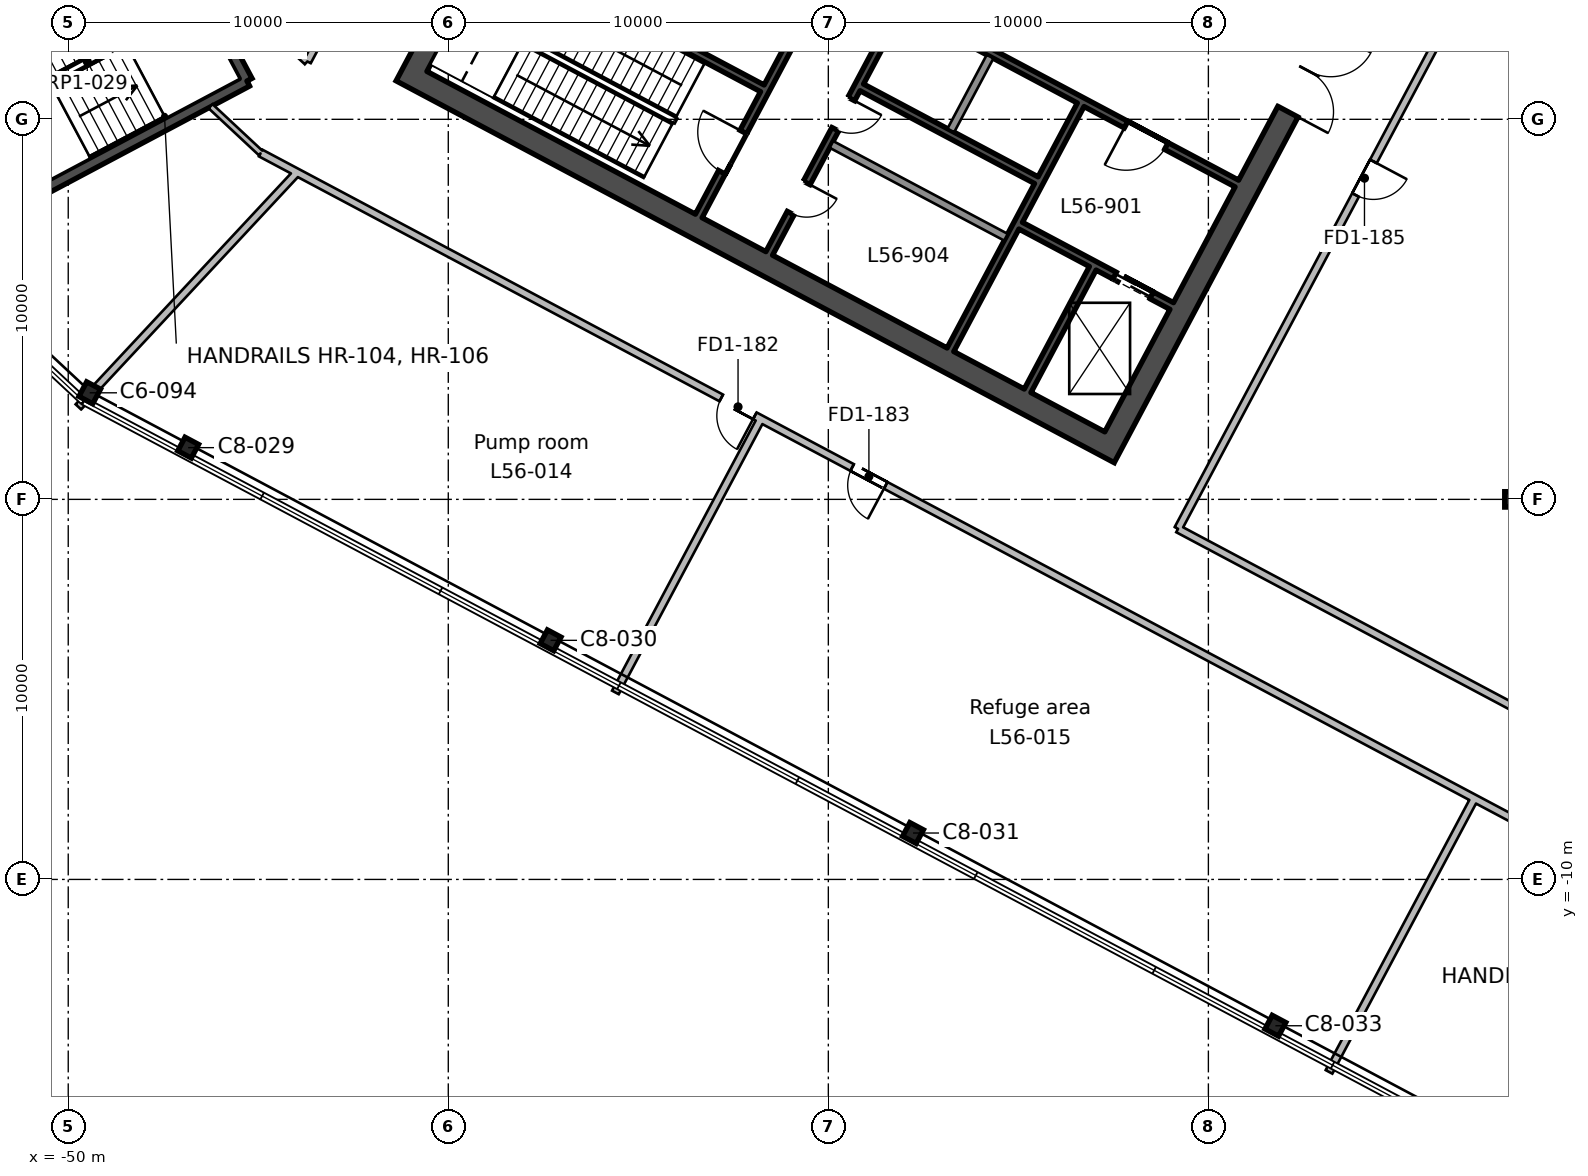
"""IFC4 building model, lengths in metres.
Left out: names, types, materials, properties, quantities, classifications, styles, units other than length and angle.
Written with IfcOpenShell. Run it as: python <this file> out.ifc"""

import sys

from ifc_helpers import new_model, si_unit, direction, frame, frame_2d, origin, origin_2d, place, context, subcontext, project, spatial, rectangle, hollow_rectangle, i_section, extrude, element, fill, save


model = new_model("IFC4")
c1 = context("Model", 3, precision=1e-05, world=origin(), true_north=direction((0.0, 1.0)))
c2 = subcontext(c1, "Body", "Model", "MODEL_VIEW")
j1 = project(units=[si_unit("LENGTHUNIT", "METRE"), si_unit("PLANEANGLEUNIT", "RADIAN")], contexts=[c1])
p1 = place(None, origin())
s1 = spatial("IfcSite", under=j1, at=p1, CompositionType="ELEMENT")
p2 = place(p1, origin())
s2 = spatial("IfcBuilding", under=s1, at=p2, CompositionType="ELEMENT")
p3 = place(p2, frame((0.0, 0.0, 252.0)))
s3 = spatial("IfcBuildingStorey", under=s2, at=p3, CompositionType="ELEMENT", Elevation=252.0)
for number, where, z_axis, x_axis in (
    (1, (-18.237, -13.85, 0.0), (0.0, 0.0, 1.0), (0.883, -0.469, 0.0)),
    (2, (-27.772, -8.779, 0.0), (0.0, 0.0, 1.0), (0.883, -0.469, 0.0)),
    (3, (-37.308, -3.709, 0.0), (0.0, 0.0, 1.0), (0.883, -0.469, 0.0)),
):
    element("IfcColumn", number, at=place(p3, frame(where, z_axis=z_axis, x_axis=x_axis)), inside=s3, PredefinedType="COLUMN", context=c2, shape_type="SweptSolid", body=[
        extrude(i_section(OverallWidth=0.404, OverallDepth=0.406, WebThickness=0.027, FlangeThickness=0.044, FilletRadius=0.015, at=origin_2d()), origin(), (0.0, 0.0, 1.0), 6.0),
    ])
p4 = place(p3, frame((-12.0, 0.0, 0.0), z_axis=(0.0, 0.0, 1.0), x_axis=(1.0, 0.0, 0.0)))
e4 = element("IfcColumn", 4, at=p4, inside=s3, PredefinedType="COLUMN", context=c2, shape_type="SweptSolid", body=[
    extrude(hollow_rectangle(XDim=0.406, YDim=0.406, WallThickness=0.015, InnerFilletRadius=0.007, OuterFilletRadius=0.022, at=origin_2d()), origin(), (0.0, 0.0, 1.0), 6.0),
])
p5 = place(p3, frame((-46.844, 1.361, 0.0), z_axis=(0.0, 0.0, 1.0), x_axis=(0.882947592859, -0.469471562786, 0.0)))
e5 = element("IfcColumn", 5, at=p5, inside=s3, PredefinedType="COLUMN", context=c2, shape_type="SweptSolid", body=[
    extrude(i_section(OverallWidth=0.404, OverallDepth=0.406, WebThickness=0.027, FlangeThickness=0.044, FilletRadius=0.015, at=origin_2d()), origin(), (0.0, 0.0, 1.0), 6.0),
])
p6 = place(p3, frame((-49.435, 2.804, 0.0), z_axis=(0.0, 0.0, 1.0), x_axis=(0.882947592859, -0.469471562786, 0.0)))
e6 = element("IfcColumn", 6, at=p6, inside=s3, PredefinedType="COLUMN", context=c2, shape_type="SweptSolid", body=[
    extrude(i_section(OverallWidth=0.412, OverallDepth=0.434, WebThickness=0.036, FlangeThickness=0.057, FilletRadius=0.015, at=origin_2d()), origin(), (0.0, 0.0, 1.0), 6.0),
])
p7 = place(p3, frame((-13.635, 18.236, 0.0), z_axis=(0.0, 0.0, 1.0), x_axis=(-0.469478769487, -0.88294376095, 0.0)))
e7 = element("IfcWall", 7, at=p7, inside=s3, PredefinedType="SHEAR", context=c2, shape_type="SweptSolid", body=[
    extrude(rectangle(XDim=19.4, YDim=0.6, at=frame_2d((9.7, 0.0))), origin(), (0.0, 0.0, 1.0), 6.0),
])
p8 = place(p7, frame((6.7, 0.0, 0.0)))
e8 = element("IfcOpeningElement", 8, at=p8, cuts=e7, PredefinedType="OPENING", context=c2, shape_type="SweptSolid", body=[
    extrude(rectangle(XDim=2.4, YDim=2.4, at=frame_2d((1.2, 1.2))), frame((0.0, 0.31, 0.0), z_axis=(0.0, -1.0, 0.0), x_axis=(1.0, 0.0, 0.0)), (0.0, 0.0, 1.0), 0.62),
])
p9 = place(p3, frame((-32.0, 28.001, 0.0), z_axis=(0.0, 0.0, 1.0), x_axis=(-0.469468958625, -0.882948977511, 0.0)))
e9 = element("IfcWall", 9, at=p9, inside=s3, PredefinedType="SHEAR", context=c2, shape_type="SweptSolid", body=[
    extrude(rectangle(XDim=19.4, YDim=0.6, at=frame_2d((9.7, 0.0))), origin(), (0.0, 0.0, 1.0), 6.0),
])
p10 = place(p9, frame((10.3, 0.0, 0.0)))
e10 = element("IfcOpeningElement", 10, at=p10, cuts=e9, PredefinedType="OPENING", context=c2, shape_type="SweptSolid", body=[
    extrude(rectangle(XDim=2.4, YDim=2.4, at=frame_2d((1.2, 1.2))), frame((0.0, 0.31, 0.0), z_axis=(0.0, -1.0, 0.0), x_axis=(1.0, 0.0, 0.0)), (0.0, 0.0, 1.0), 0.62),
])
p11 = place(p3, frame((-22.867, 1.512, 0.0), z_axis=(0.0, 0.0, 1.0), x_axis=(-0.88294509198, 0.469476266226, 0.0)))
e11 = element("IfcWall", 11, at=p11, inside=s3, PredefinedType="SHEAR", context=c2, shape_type="SweptSolid", body=[
    extrude(rectangle(XDim=20.2, YDim=0.6, at=frame_2d((10.1, 0.0))), origin(), (0.0, 0.0, 1.0), 6.0),
])
p12 = place(p3, frame((-23.043, 6.08, 0.0), z_axis=(0.0, 0.0, 1.0), x_axis=(-0.469494272526, -0.882935517501, 0.0)))
e12 = element("IfcWall", 12, at=p12, inside=s3, PredefinedType="SHEAR", context=c2, shape_type="SweptSolid", body=[
    extrude(rectangle(XDim=3.65, YDim=0.2, at=frame_2d((1.825, 0.0))), origin(), (0.0, 0.0, 1.0), 6.0),
])
p13 = place(p3, frame((-23.36, 10.382, 0.0), z_axis=(0.0, 0.0, 1.0), x_axis=(-0.469480409012, -0.88294288918, 0.0)))
e13 = element("IfcWall", 13, at=p13, inside=s3, PredefinedType="SHEAR", context=c2, shape_type="SweptSolid", body=[
    extrude(rectangle(XDim=7.3, YDim=0.2, at=frame_2d((3.65, 0.0))), origin(), (0.0, 0.0, 1.0), 6.0),
])
p14 = place(p3, frame((-25.744, 11.65, 0.0), z_axis=(0.0, 0.0, 1.0), x_axis=(-0.469487830541, -0.882938942948, 0.0)))
e14 = element("IfcWall", 14, at=p14, inside=s3, PredefinedType="SOLIDWALL", context=c2, shape_type="SweptSolid", body=[
    extrude(rectangle(XDim=2.2, YDim=0.2, at=frame_2d((1.1, 0.0))), origin(), (0.0, 0.0, 1.0), 6.0),
])
p15 = place(p3, frame((-28.128, 12.917, 0.0), z_axis=(0.0, 0.0, 1.0), x_axis=(-0.469454336211, -0.882956752176, 0.0)))
e15 = element("IfcWall", 15, at=p15, inside=s3, PredefinedType="SHEAR", context=c2, shape_type="SweptSolid", body=[
    extrude(rectangle(XDim=7.3, YDim=0.2, at=frame_2d((3.65, 0.0))), origin(), (0.0, 0.0, 1.0), 6.0),
])
p16 = place(p15, frame((2.7, 0.0, 0.0)))
e16 = element("IfcOpeningElement", 16, at=p16, cuts=e15, PredefinedType="OPENING", context=c2, shape_type="SweptSolid", body=[
    extrude(rectangle(XDim=0.9, YDim=2.1, at=frame_2d((0.45, 1.05))), frame((0.0, 0.11, 0.0), z_axis=(0.0, -1.0, 0.0), x_axis=(1.0, 0.0, 0.0)), (0.0, 0.0, 1.0), 0.22),
])
p17 = place(p15, frame((5.2, 0.0, 0.0)))
e17 = element("IfcOpeningElement", 17, at=p17, cuts=e15, PredefinedType="OPENING", context=c2, shape_type="SweptSolid", body=[
    extrude(rectangle(XDim=0.9, YDim=2.1, at=frame_2d((0.45, 1.05))), frame((0.0, 0.11, 0.0), z_axis=(0.0, -1.0, 0.0), x_axis=(1.0, 0.0, 0.0)), (0.0, 0.0, 1.0), 0.22),
])
p18 = place(p3, frame((-29.982, 13.903, 0.0), z_axis=(0.0, 0.0, 1.0), x_axis=(-0.469454336211, -0.882956752176, 0.0)))
e18 = element("IfcWall", 18, at=p18, inside=s3, PredefinedType="SHEAR", context=c2, shape_type="SweptSolid", body=[
    extrude(rectangle(XDim=7.3, YDim=0.2, at=frame_2d((3.65, 0.0))), origin(), (0.0, 0.0, 1.0), 6.0),
])
p19 = place(p18, frame((4.8, 0.0, 0.0)))
e19 = element("IfcOpeningElement", 19, at=p19, cuts=e18, PredefinedType="OPENING", context=c2, shape_type="SweptSolid", body=[
    extrude(rectangle(XDim=1.2, YDim=2.1, at=frame_2d((0.6, 1.05))), frame((0.0, 0.11, 0.0), z_axis=(0.0, -1.0, 0.0), x_axis=(1.0, 0.0, 0.0)), (0.0, 0.0, 1.0), 0.22),
])
p20 = place(p3, frame((-19.252, 8.311, 0.0), z_axis=(0.0, 0.0, 1.0), x_axis=(-0.882955722218, 0.469456273365, 0.0)))
e20 = element("IfcWall", 20, at=p20, inside=s3, PredefinedType="SHEAR", context=c2, shape_type="SweptSolid", body=[
    extrude(rectangle(XDim=10.0, YDim=0.2, at=frame_2d((5.0, 0.0))), origin(), (0.0, 0.0, 1.0), 6.0),
])
p21 = place(p20, frame((2.1, 0.0, 0.0)))
e21 = element("IfcOpeningElement", 21, at=p21, cuts=e20, PredefinedType="OPENING", context=c2, shape_type="SweptSolid", body=[
    extrude(rectangle(XDim=1.2, YDim=2.1, at=frame_2d((0.6, 1.05))), frame((0.0, 0.11, 0.0), z_axis=(0.0, -1.0, 0.0), x_axis=(1.0, 0.0, 0.0)), (0.0, 0.0, 1.0), 0.22),
])
p22 = place(p3, frame((-24.528, 8.398, 0.0), z_axis=(0.0, 0.0, 1.0), x_axis=(-0.882953967957, 0.469459572775, 0.0)))
e22 = element("IfcWall", 22, at=p22, inside=s3, PredefinedType="SHEAR", context=c2, shape_type="SweptSolid", body=[
    extrude(rectangle(XDim=5.2, YDim=0.2, at=frame_2d((2.6, 0.0))), origin(), (0.0, 0.0, 1.0), 6.0),
])
p23 = place(p3, frame((-20.965, 5.088, 0.0), z_axis=(0.0, 0.0, 1.0), x_axis=(-0.882925986334, 0.469512196493, 0.0)))
e23 = element("IfcWall", 23, at=p23, inside=s3, PredefinedType="SHEAR", context=c2, shape_type="SweptSolid", body=[
    extrude(rectangle(XDim=4.5, YDim=0.2, at=frame_2d((2.25, 0.0))), origin(), (0.0, 0.0, 1.0), 6.0),
])
p24 = place(p23, frame((0.6, 0.0, 0.0)))
e24 = element("IfcOpeningElement", 24, at=p24, cuts=e23, PredefinedType="OPENING", context=c2, shape_type="SweptSolid", body=[
    extrude(rectangle(XDim=1.1, YDim=2.1, at=frame_2d((0.55, 1.05))), frame((0.0, 0.11, 0.0), z_axis=(0.0, -1.0, 0.0), x_axis=(1.0, 0.0, 0.0)), (0.0, 0.0, 1.0), 0.22),
])
p25 = place(p3, frame((-31.737, 10.816, 0.0), z_axis=(0.0, 0.0, 1.0), x_axis=(-0.882940221191, 0.469485426614, 0.0)))
e25 = element("IfcWall", 25, at=p25, inside=s3, PredefinedType="SHEAR", context=c2, shape_type="SweptSolid", body=[
    extrude(rectangle(XDim=8.0, YDim=0.2, at=frame_2d((4.0, 0.0))), origin(), (0.0, 0.0, 1.0), 6.0),
])
p26 = place(p3, frame((-25.326, 6.897, 0.0), z_axis=(0.0, 0.0, 1.0), x_axis=(-0.882953967957, 0.469459572775, 0.0)))
e26 = element("IfcWall", 26, at=p26, inside=s3, PredefinedType="SOLIDWALL", context=c2, shape_type="SweptSolid", body=[
    extrude(rectangle(XDim=5.2, YDim=0.2, at=frame_2d((2.6, 0.0))), origin(), (0.0, 0.0, 1.0), 6.0),
])
p27 = place(p3, frame((-47.574, 15.29, 0.0), z_axis=(0.0, 0.0, 1.0), x_axis=(0.469443498566, -0.882962514297, 0.0)))
e27 = element("IfcWall", 27, at=p27, inside=s3, PredefinedType="SHEAR", context=c2, shape_type="SweptSolid", body=[
    extrude(rectangle(XDim=4.85, YDim=0.3, at=frame_2d((2.425, 0.0))), origin(), (0.0, 0.0, 1.0), 6.0),
])
p28 = place(p3, frame((-45.297, 11.007, 0.0), z_axis=(0.0, 0.0, 1.0), x_axis=(-0.882951519127, -0.469464178475, 0.0)))
e28 = element("IfcWall", 28, at=p28, inside=s3, PredefinedType="SHEAR", context=c2, shape_type="SweptSolid", body=[
    extrude(rectangle(XDim=8.3, YDim=0.3, at=frame_2d((4.15, 0.0))), origin(), (0.0, 0.0, 1.0), 6.0),
])
p29 = place(p3, frame((-54.903, 11.393, 0.0), z_axis=(0.0, 0.0, 1.0), x_axis=(0.882939326045, 0.469487110071, 0.0)))
e29 = element("IfcWall", 29, at=p29, inside=s3, PredefinedType="SHEAR", context=c2, shape_type="SweptSolid", body=[
    extrude(rectangle(XDim=8.3, YDim=0.3, at=frame_2d((4.15, 0.0))), origin(), (0.0, 0.0, 1.0), 6.0),
])
p30 = place(p29, frame((6.05, 0.0, 0.0)))
e30 = element("IfcOpeningElement", 30, at=p30, cuts=e29, PredefinedType="OPENING", context=c2, shape_type="SweptSolid", body=[
    extrude(rectangle(XDim=1.9, YDim=2.1, at=frame_2d((0.95, 1.05))), frame((0.0, 0.16, 0.0), z_axis=(0.0, -1.0, 0.0), x_axis=(1.0, 0.0, 0.0)), (0.0, 0.0, 1.0), 0.32),
])
p31 = place(p3, frame((-49.733, 2.433, 0.0), z_axis=(0.0, 0.0, 1.0), x_axis=(0.682025422231, 0.731328464802, 0.0)))
e31 = element("IfcWall", 31, at=p31, inside=s3, PredefinedType="PARTITIONING", context=c2, shape_type="SweptSolid", body=[
    extrude(rectangle(XDim=8.438, YDim=0.2, at=frame_2d((4.219, 0.0))), origin(), (0.0, 0.0, 1.0), 5.55),
])
p32 = place(p3, frame((-31.776, 2.116, 0.0), z_axis=(0.0, 0.0, 1.0), x_axis=(-0.469561804861, -0.882899604381, 0.0)))
e32 = element("IfcWall", 32, at=p32, inside=s3, PredefinedType="PARTITIONING", context=c2, shape_type="SweptSolid", body=[
    extrude(rectangle(XDim=8.15, YDim=0.2, at=frame_2d((4.075, 0.0))), origin(), (0.0, 0.0, 1.0), 5.55),
])
p33 = place(p3, frame((-33.993, 29.792, 0.0), z_axis=(0.0, 0.0, 1.0), x_axis=(-0.469462883155, -0.882952207846, 0.0)))
e33 = element("IfcWall", 33, at=p33, inside=s3, PredefinedType="PARTITIONING", context=c2, shape_type="SweptSolid", body=[
    extrude(rectangle(XDim=20.692, YDim=0.2, at=frame_2d((10.346, 0.0))), origin(), (0.0, 0.0, 1.0), 5.55),
])
p34 = place(p33, frame((9.85, 0.0, 0.0)))
e34 = element("IfcOpeningElement", 34, at=p34, cuts=e33, PredefinedType="OPENING", context=c2, shape_type="SweptSolid", body=[
    extrude(rectangle(XDim=1.0, YDim=2.1, at=frame_2d((0.5, 1.05))), frame((0.0, 0.11, 0.0), z_axis=(0.0, -1.0, 0.0), x_axis=(1.0, 0.0, 0.0)), (0.0, 0.0, 1.0), 0.22),
])
p35 = place(p3, frame((-43.707, 11.522, 0.0), z_axis=(0.0, 0.0, 1.0), x_axis=(-0.731174049231, 0.682190962803, 0.0)))
e35 = element("IfcWall", 35, at=p35, inside=s3, PredefinedType="PARTITIONING", context=c2, shape_type="SweptSolid", body=[
    extrude(rectangle(XDim=4.511, YDim=0.2, at=frame_2d((2.255, 0.0))), origin(), (0.0, 0.0, 1.0), 5.55),
])
p36 = place(p3, frame((-12.995, -7.871, 0.0), z_axis=(0.0, 0.0, 1.0), x_axis=(-0.882943167342, 0.469479885878, 0.0)))
e36 = element("IfcWall", 36, at=p36, inside=s3, PredefinedType="PARTITIONING", context=c2, shape_type="SweptSolid", body=[
    extrude(rectangle(XDim=36.174, YDim=0.2, at=frame_2d((18.087, 0.0))), origin(), (0.0, 0.0, 1.0), 5.55),
])
p37 = place(p36, frame((21.45, 0.0, 0.0)))
e37 = element("IfcOpeningElement", 37, at=p37, cuts=e36, PredefinedType="OPENING", context=c2, shape_type="SweptSolid", body=[
    extrude(rectangle(XDim=1.0, YDim=2.1, at=frame_2d((0.5, 1.05))), frame((0.0, 0.11, 0.0), z_axis=(0.0, -1.0, 0.0), x_axis=(1.0, 0.0, 0.0)), (0.0, 0.0, 1.0), 0.22),
])
p38 = place(p36, frame((17.55, 0.0, 0.0)))
e38 = element("IfcOpeningElement", 38, at=p38, cuts=e36, PredefinedType="OPENING", context=c2, shape_type="SweptSolid", body=[
    extrude(rectangle(XDim=1.0, YDim=2.1, at=frame_2d((0.5, 1.05))), frame((0.0, 0.11, 0.0), z_axis=(0.0, -1.0, 0.0), x_axis=(1.0, 0.0, 0.0)), (0.0, 0.0, 1.0), 0.22),
])
p39 = place(p3, frame((-44.935, 9.112, 0.0), z_axis=(0.0, 0.0, 1.0), x_axis=(-0.731023795843, 0.682351969229, 0.0)))
e39 = element("IfcWall", 39, at=p39, inside=s3, PredefinedType="PARTITIONING", context=c2, shape_type="SweptSolid", body=[
    extrude(rectangle(XDim=1.806, YDim=0.15, at=frame_2d((0.903, 0.0))), origin(), (0.0, 0.0, 1.0), 5.55),
])
p40 = place(p3, frame((-12.999, -7.868, 0.0), z_axis=(0.0, 0.0, 1.0), x_axis=(-0.46953845473, -0.882912022531, 0.0)))
e40 = element("IfcWall", 40, at=p40, inside=s3, PredefinedType="PARTITIONING", context=c2, shape_type="SweptSolid", body=[
    extrude(rectangle(XDim=8.15, YDim=0.2, at=frame_2d((4.075, 0.0))), origin(), (0.0, 0.0, 1.0), 5.55),
])
p41 = place(p3, frame((-12.995, -7.871, 0.0), z_axis=(0.0, 0.0, 1.0), x_axis=(0.883081189118, -0.469220218475, 0.0)))
e41 = element("IfcWall", 41, at=p41, inside=s3, PredefinedType="PARTITIONING", context=c2, shape_type="SweptSolid", body=[
    extrude(rectangle(XDim=12.908, YDim=0.2, at=frame_2d((6.454, 0.0))), origin(), (0.0, 0.0, 1.0), 5.55),
])
p42 = place(p41, frame((5.95, 0.0, 0.0)))
e42 = element("IfcOpeningElement", 42, at=p42, cuts=e41, PredefinedType="OPENING", context=c2, shape_type="SweptSolid", body=[
    extrude(rectangle(XDim=1.0, YDim=2.1, at=frame_2d((0.5, 1.05))), frame((0.0, 0.11, 0.0), z_axis=(0.0, -1.0, 0.0), x_axis=(1.0, 0.0, 0.0)), (0.0, 0.0, 1.0), 0.22),
])
p43 = place(p3, frame((-5.572, -8.873, 0.0), z_axis=(0.0, 0.0, 1.0), x_axis=(-0.882928328785, 0.469507791446, 0.0)))
e43 = element("IfcWall", 43, at=p43, inside=s3, PredefinedType="PARTITIONING", context=c2, shape_type="SweptSolid", body=[
    extrude(rectangle(XDim=17.246, YDim=0.2, at=frame_2d((8.623, 0.0))), origin(), (0.0, 0.0, 1.0), 5.55),
])
p44 = place(p3, frame((-20.799, -0.776, 0.0), z_axis=(0.0, 0.0, 1.0), x_axis=(0.469488010228, 0.882938847402, 0.0)))
e44 = element("IfcWall", 44, at=p44, inside=s3, PredefinedType="PARTITIONING", context=c2, shape_type="SweptSolid", body=[
    extrude(rectangle(XDim=20.899, YDim=0.2, at=frame_2d((10.45, 0.0))), origin(), (0.0, 0.0, 1.0), 5.55),
])
p45 = place(p44, frame((9.95, 0.0, 0.0)))
e45 = element("IfcOpeningElement", 45, at=p45, cuts=e44, PredefinedType="OPENING", context=c2, shape_type="SweptSolid", body=[
    extrude(rectangle(XDim=1.0, YDim=2.1, at=frame_2d((0.5, 1.05))), frame((0.0, 0.11, 0.0), z_axis=(0.0, -1.0, 0.0), x_axis=(1.0, 0.0, 0.0)), (0.0, 0.0, 1.0), 0.22),
])
p46 = place(p8, origin())
e46 = element("IfcDoor", 46, at=p46, inside=s3, OperationType="DOUBLE_DOOR_SINGLE_SWING", PredefinedType="DOOR", context=c2, shape_type="SweptSolid", body=[
    extrude(rectangle(XDim=2.4, YDim=2.4, at=frame_2d((1.2, 1.2))), frame((0.0, 0.025, 0.0), z_axis=(0.0, -1.0, 0.0), x_axis=(1.0, 0.0, 0.0)), (0.0, 0.0, 1.0), 0.05),
])
fill(e8, e46)
p47 = place(p21, origin())
e47 = element("IfcDoor", 47, at=p47, inside=s3, OperationType="SINGLE_SWING_RIGHT", PredefinedType="DOOR", context=c2, shape_type="SweptSolid", body=[
    extrude(rectangle(XDim=1.2, YDim=2.1, at=frame_2d((0.6, 1.05))), frame((0.0, 0.025, 0.0), z_axis=(0.0, -1.0, 0.0), x_axis=(1.0, 0.0, 0.0)), (0.0, 0.0, 1.0), 0.05),
])
fill(e21, e47)
p48 = place(p19, frame((1.2, 0.0, 0.0), z_axis=(0.0, 0.0, 1.0), x_axis=(-1.0, 0.0, 0.0)))
e48 = element("IfcDoor", 48, at=p48, inside=s3, OperationType="SINGLE_SWING_RIGHT", PredefinedType="DOOR", context=c2, shape_type="SweptSolid", body=[
    extrude(rectangle(XDim=1.2, YDim=2.1, at=frame_2d((0.6, 1.05))), frame((0.0, 0.025, 0.0), z_axis=(0.0, -1.0, 0.0), x_axis=(1.0, 0.0, 0.0)), (0.0, 0.0, 1.0), 0.05),
])
fill(e19, e48)
p49 = place(p24, origin())
e49 = element("IfcDoor", 49, at=p49, inside=s3, OperationType="DOUBLE_DOOR_SLIDING", PredefinedType="DOOR", context=c2, shape_type="SweptSolid", body=[
    extrude(rectangle(XDim=1.1, YDim=2.1, at=frame_2d((0.55, 1.05))), frame((0.0, 0.025, 0.0), z_axis=(0.0, -1.0, 0.0), x_axis=(1.0, 0.0, 0.0)), (0.0, 0.0, 1.0), 0.05),
])
fill(e24, e49)
p50 = place(p16, origin())
e50 = element("IfcDoor", 50, at=p50, inside=s3, OperationType="SINGLE_SWING_LEFT", PredefinedType="DOOR", context=c2, shape_type="SweptSolid", body=[
    extrude(rectangle(XDim=0.9, YDim=2.1, at=frame_2d((0.45, 1.05))), frame((0.0, 0.025, 0.0), z_axis=(0.0, -1.0, 0.0), x_axis=(1.0, 0.0, 0.0)), (0.0, 0.0, 1.0), 0.05),
])
fill(e16, e50)
p51 = place(p17, origin())
e51 = element("IfcDoor", 51, at=p51, inside=s3, OperationType="SINGLE_SWING_LEFT", PredefinedType="DOOR", context=c2, shape_type="SweptSolid", body=[
    extrude(rectangle(XDim=0.9, YDim=2.1, at=frame_2d((0.45, 1.05))), frame((0.0, 0.025, 0.0), z_axis=(0.0, -1.0, 0.0), x_axis=(1.0, 0.0, 0.0)), (0.0, 0.0, 1.0), 0.05),
])
fill(e17, e51)
p52 = place(p37, origin())
e52 = element("IfcDoor", 52, at=p52, inside=s3, OperationType="SINGLE_SWING_LEFT", PredefinedType="DOOR", context=c2, shape_type="SweptSolid", body=[
    extrude(rectangle(XDim=1.0, YDim=2.1, at=frame_2d((0.5, 1.05))), frame((0.0, 0.025, 0.0), z_axis=(0.0, -1.0, 0.0), x_axis=(1.0, 0.0, 0.0)), (0.0, 0.0, 1.0), 0.05),
])
fill(e37, e52)
p53 = place(p38, origin())
e53 = element("IfcDoor", 53, at=p53, inside=s3, OperationType="SINGLE_SWING_LEFT", PredefinedType="DOOR", context=c2, shape_type="SweptSolid", body=[
    extrude(rectangle(XDim=1.0, YDim=2.1, at=frame_2d((0.5, 1.05))), frame((0.0, 0.025, 0.0), z_axis=(0.0, -1.0, 0.0), x_axis=(1.0, 0.0, 0.0)), (0.0, 0.0, 1.0), 0.05),
])
fill(e38, e53)
p54 = place(p45, frame((1.0, 0.0, 0.0), z_axis=(0.0, 0.0, 1.0), x_axis=(-1.0, 0.0, 0.0)))
e54 = element("IfcDoor", 54, at=p54, inside=s3, OperationType="SINGLE_SWING_LEFT", PredefinedType="DOOR", context=c2, shape_type="SweptSolid", body=[
    extrude(rectangle(XDim=1.0, YDim=2.1, at=frame_2d((0.5, 1.05))), frame((0.0, 0.025, 0.0), z_axis=(0.0, -1.0, 0.0), x_axis=(1.0, 0.0, 0.0)), (0.0, 0.0, 1.0), 0.05),
])
fill(e45, e54)
save(model, sys.argv[1])
